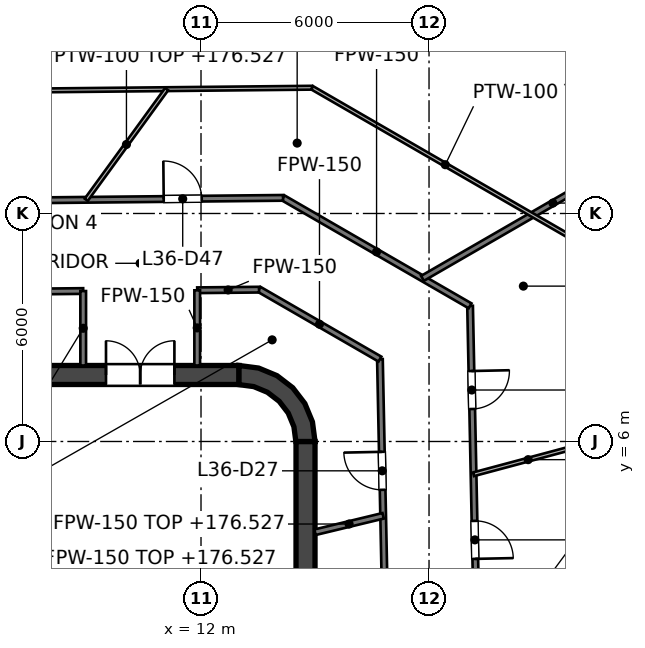
"""IFC4 building model, lengths in metres.
Left out: names, types, materials, properties, quantities, classifications, styles, units other than length and angle.
Written with IfcOpenShell. Run it as: python <this file> out.ifc"""

import sys

from ifc_helpers import new_model, si_unit, direction, frame, frame_2d, origin, place, context, subcontext, project, spatial, polyline, rectangle, outline, extrude, element, fill, save


model = new_model("IFC4")
c1 = context("Model", 3, precision=1e-05, world=origin(), true_north=direction((0.0, 1.0)))
c2 = subcontext(c1, "Body", "Model", "MODEL_VIEW")
j1 = project(units=[si_unit("LENGTHUNIT", "METRE"), si_unit("PLANEANGLEUNIT", "RADIAN")], contexts=[c1])
p1 = place(None, origin())
s1 = spatial("IfcSite", under=j1, at=p1, CompositionType="ELEMENT")
p2 = place(p1, origin())
s2 = spatial("IfcBuilding", under=s1, at=p2, CompositionType="ELEMENT")
p3 = place(p2, frame((0.0, 0.0, 173.6)))
s3 = spatial("IfcBuildingStorey", under=s2, at=p3, CompositionType="ELEMENT", Elevation=173.6)
p4 = place(p3, frame((-13.0, 7.75, 0.0), z_axis=(0.0, 0.0, 1.0), x_axis=(1.0, 0.0, 0.0)))
e1 = element("IfcWall", 1, at=p4, inside=s3, PredefinedType="SHEAR", context=c2, shape_type="SweptSolid", body=[
    extrude(rectangle(XDim=26.0, YDim=0.5, at=frame_2d((13.0, 0.0))), origin(), (0.0, 0.0, 1.0), 4.0),
])
p5 = place(p4, frame((1.7, 0.0, 0.0)))
e2 = element("IfcOpeningElement", 2, at=p5, cuts=e1, PredefinedType="OPENING", context=c2, shape_type="SweptSolid", body=[
    extrude(rectangle(XDim=1.8, YDim=2.1, at=frame_2d((0.9, 1.05))), frame((0.0, 0.25, 0.0), z_axis=(0.0, -1.0, 0.0), x_axis=(1.0, 0.0, 0.0)), (0.0, 0.0, 1.0), 0.5),
])
p6 = place(p4, frame((22.5, 0.0, 0.0)))
e3 = element("IfcOpeningElement", 3, at=p6, cuts=e1, PredefinedType="OPENING", context=c2, shape_type="SweptSolid", body=[
    extrude(rectangle(XDim=1.8, YDim=2.1, at=frame_2d((0.9, 1.05))), frame((0.0, 0.25, 0.0), z_axis=(0.0, -1.0, 0.0), x_axis=(1.0, 0.0, 0.0)), (0.0, 0.0, 1.0), 0.5),
])
p7 = place(p3, frame((14.75, -6.0, 0.0), z_axis=(0.0, 0.0, 1.0), x_axis=(0.0, 1.0, 0.0)))
e4 = element("IfcWall", 4, at=p7, inside=s3, PredefinedType="SHEAR", context=c2, shape_type="SweptSolid", body=[
    extrude(rectangle(XDim=12.0, YDim=0.5, at=frame_2d((6.0, 0.0))), origin(), (0.0, 0.0, 1.0), 4.0),
])
p8 = place(p3, origin())
e5 = element("IfcWall", 5, at=p8, inside=s3, PredefinedType="SHEAR", context=c2, shape_type="SweptSolid", body=[
    extrude(outline(polyline([(13.0, 8.0), (13.0, 7.496), (13.387, 7.445), (13.748, 7.295), (14.058, 7.058), (14.295, 6.748), (14.445, 6.387), (14.496, 6.0), (15.0, 6.0), (14.932, 6.518), (14.732, 7.0), (14.414, 7.414), (14.0, 7.732), (13.518, 7.932), (13.0, 8.0)])), origin(), (0.0, 0.0, 1.0), 4.0),
])
p9 = place(p3, frame((9.0, 4.1, 0.0), z_axis=(0.0, 0.0, 1.0), x_axis=(0.0, 1.0, 0.0)))
e6 = element("IfcWall", 6, at=p9, inside=s3, PredefinedType="SOLIDWALL", context=c2, shape_type="SweptSolid", body=[
    extrude(rectangle(XDim=2.5, YDim=0.25, at=frame_2d((1.25, 0.0))), origin(), (0.0, 0.0, 1.0), 3.85),
])
p10 = place(p9, frame((0.65, 0.0, 0.0)))
e7 = element("IfcOpeningElement", 7, at=p10, cuts=e6, PredefinedType="OPENING", context=c2, shape_type="SweptSolid", body=[
    extrude(rectangle(XDim=1.2, YDim=2.1, at=frame_2d((0.6, 1.05))), frame((0.0, 0.125, 0.0), z_axis=(0.0, -1.0, 0.0), x_axis=(1.0, 0.0, 0.0)), (0.0, 0.0, 1.0), 0.25),
])
p11 = place(p3, frame((-9.125, 7.05, 0.0), z_axis=(0.0, 0.0, 1.0), x_axis=(1.0, 0.0, 0.0)))
e8 = element("IfcWall", 8, at=p11, inside=s3, PredefinedType="SOLIDWALL", context=c2, shape_type="SweptSolid", body=[
    extrude(rectangle(XDim=18.25, YDim=0.9, at=frame_2d((9.125, 0.0))), origin(), (0.0, 0.0, 1.0), 3.85),
])
p12 = place(p3, frame((0.775, 3.975, 0.0), z_axis=(0.0, 0.0, 1.0), x_axis=(1.0, 0.0, 0.0)))
e9 = element("IfcWall", 9, at=p12, inside=s3, PredefinedType="SOLIDWALL", context=c2, shape_type="SweptSolid", body=[
    extrude(rectangle(XDim=8.35, YDim=0.25, at=frame_2d((4.175, 0.0))), origin(), (0.0, 0.0, 1.0), 3.85),
])
p13 = place(p3, frame((9.0, 1.65, 0.0), z_axis=(0.0, 0.0, 1.0), x_axis=(0.0, 1.0, 0.0)))
e10 = element("IfcWall", 10, at=p13, inside=s3, PredefinedType="PARTITIONING", context=c2, shape_type="SweptSolid", body=[
    extrude(rectangle(XDim=2.2, YDim=0.25, at=frame_2d((1.1, 0.0))), origin(), (0.0, 0.0, 1.0), 3.85),
])
p14 = place(p3, frame((11.8, -7.5, 0.0), z_axis=(0.0, 0.0, 1.0), x_axis=(0.0, 1.0, 0.0)))
e11 = element("IfcWall", 11, at=p14, inside=s3, PredefinedType="SOLIDWALL", context=c2, shape_type="SweptSolid", body=[
    extrude(rectangle(XDim=15.0, YDim=0.4, at=frame_2d((7.5, 0.0))), origin(), (0.0, 0.0, 1.0), 3.85),
])
p15 = place(p14, frame((11.3, 0.0, 0.0)))
e12 = element("IfcOpeningElement", 12, at=p15, cuts=e11, PredefinedType="OPENING", context=c2, shape_type="SweptSolid", body=[
    extrude(rectangle(XDim=1.1, YDim=2.1, at=frame_2d((0.55, 1.05))), frame((0.0, 0.2, 0.0), z_axis=(0.0, -1.0, 0.0), x_axis=(1.0, 0.0, 0.0)), (0.0, 0.0, 1.0), 0.4),
])
p16 = place(p14, frame((8.4, 0.0, 0.0)))
e13 = element("IfcOpeningElement", 13, at=p16, cuts=e11, PredefinedType="OPENING", context=c2, shape_type="SweptSolid", body=[
    extrude(rectangle(XDim=1.1, YDim=2.1, at=frame_2d((0.55, 1.05))), frame((0.0, 0.2, 0.0), z_axis=(0.0, -1.0, 0.0), x_axis=(1.0, 0.0, 0.0)), (0.0, 0.0, 1.0), 0.4),
])
p17 = place(p14, frame((5.5, 0.0, 0.0)))
e14 = element("IfcOpeningElement", 14, at=p17, cuts=e11, PredefinedType="OPENING", context=c2, shape_type="SweptSolid", body=[
    extrude(rectangle(XDim=1.1, YDim=2.1, at=frame_2d((0.55, 1.05))), frame((0.0, 0.2, 0.0), z_axis=(0.0, -1.0, 0.0), x_axis=(1.0, 0.0, 0.0)), (0.0, 0.0, 1.0), 0.4),
])
p18 = place(p14, frame((13.697, 0.0, 0.0)))
e15 = element("IfcOpeningElement", 15, at=p18, cuts=e11, PredefinedType="OPENING", context=c2, shape_type="SweptSolid", body=[
    extrude(rectangle(XDim=0.9, YDim=2.1, at=frame_2d((0.45, 1.05))), frame((0.0, 0.2, 0.0), z_axis=(0.0, -1.0, 0.0), x_axis=(1.0, 0.0, 0.0)), (0.0, 0.0, 1.0), 0.4),
])
p19 = place(p14, frame((0.403, 0.0, 0.0)))
e16 = element("IfcOpeningElement", 16, at=p19, cuts=e11, PredefinedType="OPENING", context=c2, shape_type="SweptSolid", body=[
    extrude(rectangle(XDim=0.9, YDim=2.1, at=frame_2d((0.45, 1.05))), frame((0.0, 0.2, 0.0), z_axis=(0.0, -1.0, 0.0), x_axis=(1.0, 0.0, 0.0)), (0.0, 0.0, 1.0), 0.4),
])
e17 = element("IfcWall", 17, at=p8, inside=s3, PredefinedType="SOLIDWALL", context=c2, shape_type="SweptSolid", body=[
    extrude(outline(polyline([(12.0, -5.675), (12.0, -5.925), (14.25, -5.925), (14.5, -5.925), (14.5, -5.675), (14.5, -3.025), (14.5, -2.775), (14.5, -0.125), (14.5, 0.125), (14.5, 2.775), (14.5, 3.025), (14.5, 5.675), (14.5, 5.925), (14.25, 5.925), (12.0, 5.925), (12.0, 5.675), (14.25, 5.675), (14.25, 3.025), (12.0, 3.025), (12.0, 2.775), (14.25, 2.775), (14.25, 0.125), (12.0, 0.125), (12.0, -0.125), (14.25, -0.125), (14.25, -2.775), (12.0, -2.775), (12.0, -3.025), (14.25, -3.025), (14.25, -5.675), (12.0, -5.675)])), origin(), (0.0, 0.0, 1.0), 3.85),
])
p20 = place(p3, frame((16.708, 8.168, 0.0), z_axis=(0.0, 0.0, 1.0), x_axis=(0.020577520638, -0.999788260405, 0.0)))
e18 = element("IfcWall", 18, at=p20, inside=s3, PredefinedType="PARTITIONING", context=c2, shape_type="SweptSolid", body=[
    extrude(rectangle(XDim=14.688, YDim=0.15, at=frame_2d((7.344, 0.0))), origin(), (0.0, 0.0, 1.0), 2.927),
])
p21 = place(p20, frame((7.54, 0.0, 0.0)))
e19 = element("IfcOpeningElement", 19, at=p21, cuts=e18, PredefinedType="OPENING", context=c2, shape_type="SweptSolid", body=[
    extrude(rectangle(XDim=1.0, YDim=2.1, at=frame_2d((0.5, 1.05))), frame((0.0, 0.075, 0.0), z_axis=(0.0, -1.0, 0.0), x_axis=(1.0, 0.0, 0.0)), (0.0, 0.0, 1.0), 0.15),
])
p22 = place(p20, frame((2.44, 0.0, 0.0)))
e20 = element("IfcOpeningElement", 20, at=p22, cuts=e18, PredefinedType="OPENING", context=c2, shape_type="SweptSolid", body=[
    extrude(rectangle(XDim=1.0, YDim=2.1, at=frame_2d((0.5, 1.05))), frame((0.0, 0.075, 0.0), z_axis=(0.0, -1.0, 0.0), x_axis=(1.0, 0.0, 0.0)), (0.0, 0.0, 1.0), 0.15),
])
p23 = place(p3, frame((19.08, 9.57, 0.0), z_axis=(0.0, 0.0, 1.0), x_axis=(0.020585419538, -0.9997880978, 0.0)))
e21 = element("IfcWall", 21, at=p23, inside=s3, PredefinedType="PARTITIONING", context=c2, shape_type="SweptSolid", body=[
    extrude(rectangle(XDim=16.711, YDim=0.15, at=frame_2d((8.355, 0.0))), origin(), (0.0, 0.0, 1.0), 2.927),
])
p24 = place(p23, frame((15.239, 0.0, 0.0)))
e22 = element("IfcOpeningElement", 22, at=p24, cuts=e21, PredefinedType="OPENING", context=c2, shape_type="SweptSolid", body=[
    extrude(rectangle(XDim=1.0, YDim=2.1, at=frame_2d((0.5, 1.05))), frame((0.0, 0.075, 0.0), z_axis=(0.0, -1.0, 0.0), x_axis=(1.0, 0.0, 0.0)), (0.0, 0.0, 1.0), 0.15),
])
p25 = place(p23, frame((12.992, 0.0, 0.0)))
e23 = element("IfcOpeningElement", 23, at=p25, cuts=e21, PredefinedType="OPENING", context=c2, shape_type="SweptSolid", body=[
    extrude(rectangle(XDim=1.0, YDim=2.1, at=frame_2d((0.5, 1.05))), frame((0.0, 0.075, 0.0), z_axis=(0.0, -1.0, 0.0), x_axis=(1.0, 0.0, 0.0)), (0.0, 0.0, 1.0), 0.15),
])
p26 = place(p23, frame((9.024, 0.0, 0.0)))
e24 = element("IfcOpeningElement", 24, at=p26, cuts=e21, PredefinedType="OPENING", context=c2, shape_type="SweptSolid", body=[
    extrude(rectangle(XDim=1.0, YDim=2.1, at=frame_2d((0.5, 1.05))), frame((0.0, 0.075, 0.0), z_axis=(0.0, -1.0, 0.0), x_axis=(1.0, 0.0, 0.0)), (0.0, 0.0, 1.0), 0.15),
])
p27 = place(p23, frame((5.66, 0.0, 0.0)))
e25 = element("IfcOpeningElement", 25, at=p27, cuts=e21, PredefinedType="OPENING", context=c2, shape_type="SweptSolid", body=[
    extrude(rectangle(XDim=1.0, YDim=2.1, at=frame_2d((0.5, 1.05))), frame((0.0, 0.075, 0.0), z_axis=(0.0, -1.0, 0.0), x_axis=(1.0, 0.0, 0.0)), (0.0, 0.0, 1.0), 0.15),
])
p28 = place(p23, frame((1.716, 0.0, 0.0)))
e26 = element("IfcOpeningElement", 26, at=p28, cuts=e21, PredefinedType="OPENING", context=c2, shape_type="SweptSolid", body=[
    extrude(rectangle(XDim=1.0, YDim=2.1, at=frame_2d((0.5, 1.05))), frame((0.0, 0.075, 0.0), z_axis=(0.0, -1.0, 0.0), x_axis=(1.0, 0.0, 0.0)), (0.0, 0.0, 1.0), 0.15),
])
p29 = place(p3, frame((13.527, 10.005, 0.0), z_axis=(0.0, 0.0, 1.0), x_axis=(0.865976376876, -0.500084907484, 0.0)))
e27 = element("IfcWall", 27, at=p29, inside=s3, PredefinedType="PARTITIONING", context=c2, shape_type="SweptSolid", body=[
    extrude(rectangle(XDim=3.673, YDim=0.15, at=frame_2d((1.836, 0.0))), origin(), (0.0, 0.0, 1.0), 2.995),
])
p30 = place(p3, frame((14.159, 12.412, 0.0), z_axis=(0.0, 0.0, 1.0), x_axis=(0.865963066672, -0.500107955506, 0.0)))
e28 = element("IfcWall", 28, at=p30, inside=s3, PredefinedType="PARTITIONING", context=c2, shape_type="SweptSolid", body=[
    extrude(rectangle(XDim=5.683, YDim=0.15, at=frame_2d((2.841, 0.0))), origin(), (0.0, 0.0, 1.0), 2.995),
])
p31 = place(p3, frame((-8.9, 9.783, 0.0), z_axis=(0.0, 0.0, 1.0), x_axis=(0.999950834077, 0.009916119672, 0.0)))
e29 = element("IfcWall", 29, at=p31, inside=s3, PredefinedType="PARTITIONING", context=c2, shape_type="SweptSolid", body=[
    extrude(rectangle(XDim=17.801, YDim=0.15, at=frame_2d((8.9, 0.0))), origin(), (0.0, 0.0, 1.0), 2.927),
])
p32 = place(p31, frame((12.8, 0.0, 0.0)))
e30 = element("IfcOpeningElement", 30, at=p32, cuts=e29, PredefinedType="OPENING", context=c2, shape_type="SweptSolid", body=[
    extrude(rectangle(XDim=1.0, YDim=2.1, at=frame_2d((0.5, 1.05))), frame((0.0, 0.075, 0.0), z_axis=(0.0, -1.0, 0.0), x_axis=(1.0, 0.0, 0.0)), (0.0, 0.0, 1.0), 0.15),
])
p33 = place(p31, frame((3.899, 0.0, 0.0)))
e31 = element("IfcOpeningElement", 31, at=p33, cuts=e29, PredefinedType="OPENING", context=c2, shape_type="SweptSolid", body=[
    extrude(rectangle(XDim=1.0, YDim=2.1, at=frame_2d((0.5, 1.05))), frame((0.0, 0.075, 0.0), z_axis=(0.0, -1.0, 0.0), x_axis=(1.0, 0.0, 0.0)), (0.0, 0.0, 1.0), 0.15),
])
p34 = place(p3, frame((11.9, 9.98, 0.0), z_axis=(0.0, 0.0, 1.0), x_axis=(0.999950974094, 0.009901990141, 0.0)))
e32 = element("IfcWall", 32, at=p34, inside=s3, PredefinedType="PARTITIONING", context=c2, shape_type="SweptSolid", body=[
    extrude(rectangle(XDim=1.627, YDim=0.15, at=frame_2d((0.813, 0.0))), origin(), (0.0, 0.0, 1.0), 2.995),
])
p35 = place(p3, frame((-16.555, 12.107, 0.0), z_axis=(0.0, 0.0, 1.0), x_axis=(0.999950956073, 0.009903809825, 0.0)))
e33 = element("IfcWall", 33, at=p35, inside=s3, PredefinedType="PARTITIONING", context=c2, shape_type="SweptSolid", body=[
    extrude(rectangle(XDim=30.715, YDim=0.15, at=frame_2d((15.358, 0.0))), origin(), (0.0, 0.0, 1.0), 2.927),
])
p36 = place(p35, frame((27.575, 0.0, 0.0)))
e34 = element("IfcOpeningElement", 34, at=p36, cuts=e33, PredefinedType="OPENING", context=c2, shape_type="SweptSolid", body=[
    extrude(rectangle(XDim=1.0, YDim=2.1, at=frame_2d((0.5, 1.05))), frame((0.0, 0.075, 0.0), z_axis=(0.0, -1.0, 0.0), x_axis=(1.0, 0.0, 0.0)), (0.0, 0.0, 1.0), 0.15),
])
p37 = place(p35, frame((20.496, 0.0, 0.0)))
e35 = element("IfcOpeningElement", 35, at=p37, cuts=e33, PredefinedType="OPENING", context=c2, shape_type="SweptSolid", body=[
    extrude(rectangle(XDim=1.0, YDim=2.1, at=frame_2d((0.5, 1.05))), frame((0.0, 0.075, 0.0), z_axis=(0.0, -1.0, 0.0), x_axis=(1.0, 0.0, 0.0)), (0.0, 0.0, 1.0), 0.15),
])
p38 = place(p35, frame((13.746, 0.0, 0.0)))
e36 = element("IfcOpeningElement", 36, at=p38, cuts=e33, PredefinedType="OPENING", context=c2, shape_type="SweptSolid", body=[
    extrude(rectangle(XDim=1.0, YDim=2.1, at=frame_2d((0.5, 1.05))), frame((0.0, 0.075, 0.0), z_axis=(0.0, -1.0, 0.0), x_axis=(1.0, 0.0, 0.0)), (0.0, 0.0, 1.0), 0.15),
])
p39 = place(p35, frame((7.941, 0.0, 0.0)))
e37 = element("IfcOpeningElement", 37, at=p39, cuts=e33, PredefinedType="OPENING", context=c2, shape_type="SweptSolid", body=[
    extrude(rectangle(XDim=1.0, YDim=2.1, at=frame_2d((0.5, 1.05))), frame((0.0, 0.075, 0.0), z_axis=(0.0, -1.0, 0.0), x_axis=(1.0, 0.0, 0.0)), (0.0, 0.0, 1.0), 0.15),
])
p40 = place(p35, frame((2.812, 0.0, 0.0)))
e38 = element("IfcOpeningElement", 38, at=p40, cuts=e33, PredefinedType="OPENING", context=c2, shape_type="SweptSolid", body=[
    extrude(rectangle(XDim=1.0, YDim=2.1, at=frame_2d((0.5, 1.05))), frame((0.0, 0.075, 0.0), z_axis=(0.0, -1.0, 0.0), x_axis=(1.0, 0.0, 0.0)), (0.0, 0.0, 1.0), 0.15),
])
p41 = place(p3, frame((15.0, 3.612, 0.0), z_axis=(0.0, 0.0, 1.0), x_axis=(0.972133200519, 0.234429180027, 0.0)))
e39 = element("IfcWall", 39, at=p41, inside=s3, PredefinedType="PARTITIONING", context=c2, shape_type="SweptSolid", body=[
    extrude(rectangle(XDim=1.844, YDim=0.15, at=frame_2d((0.922, 0.0))), origin(), (0.0, 0.0, 1.0), 2.927),
])
p42 = place(p3, frame((17.828, 10.293, 0.0), z_axis=(0.0, 0.0, 1.0), x_axis=(0.866006511702, 0.500032720618, 0.0)))
e40 = element("IfcWall", 40, at=p42, inside=s3, PredefinedType="PARTITIONING", context=c2, shape_type="SweptSolid", body=[
    extrude(rectangle(XDim=7.924, YDim=0.15, at=frame_2d((3.962, 0.0))), origin(), (0.0, 0.0, 1.0), 3.152),
])
p43 = place(p3, frame((11.9, 8.0, 0.0), z_axis=(0.0, 0.0, 1.0), x_axis=(0.0, 1.0, 0.0)))
e41 = element("IfcWall", 41, at=p43, inside=s3, PredefinedType="PARTITIONING", context=c2, shape_type="SweptSolid", body=[
    extrude(rectangle(XDim=1.978, YDim=0.15, at=frame_2d((0.989, 0.0))), origin(), (0.0, 0.0, 1.0), 2.995),
])
p44 = place(p3, frame((8.9, 8.0, 0.0), z_axis=(0.0, 0.0, 1.0), x_axis=(0.0, 1.0, 0.0)))
e42 = element("IfcWall", 42, at=p44, inside=s3, PredefinedType="PARTITIONING", context=c2, shape_type="SweptSolid", body=[
    extrude(rectangle(XDim=1.959, YDim=0.15, at=frame_2d((0.979, 0.0))), origin(), (0.0, 0.0, 1.0), 3.076),
])
p45 = place(p3, frame((14.92, 15.31, 0.0), z_axis=(0.0, 0.0, 1.0), x_axis=(0.865883926938, -0.500244965063, 0.0)))
e43 = element("IfcWall", 43, at=p45, inside=s3, PredefinedType="PARTITIONING", context=c2, shape_type="SweptSolid", body=[
    extrude(rectangle(XDim=8.102, YDim=0.1, at=frame_2d((4.051, 0.0))), origin(), (0.0, 0.0, 1.0), 2.995),
])
p46 = place(p3, frame((-11.36, 15.048, 0.0), z_axis=(0.0, 0.0, 1.0), x_axis=(0.999950506848, 0.00994906304, 0.0)))
e44 = element("IfcWall", 44, at=p46, inside=s3, PredefinedType="PARTITIONING", context=c2, shape_type="SweptSolid", body=[
    extrude(rectangle(XDim=26.281, YDim=0.1, at=frame_2d((13.141, 0.0))), origin(), (0.0, 0.0, 1.0), 2.927),
])
p47 = place(p46, frame((16.01, 0.0, 0.0)))
e45 = element("IfcOpeningElement", 45, at=p47, cuts=e44, PredefinedType="OPENING", context=c2, shape_type="SweptSolid", body=[
    extrude(rectangle(XDim=1.8, YDim=2.1, at=frame_2d((0.9, 1.05))), frame((0.0, 0.05, 0.0), z_axis=(0.0, -1.0, 0.0), x_axis=(1.0, 0.0, 0.0)), (0.0, 0.0, 1.0), 0.1),
])
p48 = place(p46, frame((5.23, 0.0, 0.0)))
e46 = element("IfcOpeningElement", 46, at=p48, cuts=e44, PredefinedType="OPENING", context=c2, shape_type="SweptSolid", body=[
    extrude(rectangle(XDim=0.9, YDim=2.1, at=frame_2d((0.45, 1.05))), frame((0.0, 0.05, 0.0), z_axis=(0.0, -1.0, 0.0), x_axis=(1.0, 0.0, 0.0)), (0.0, 0.0, 1.0), 0.1),
])
p49 = place(p3, frame((19.171, 5.137, 0.0), z_axis=(0.0, 0.0, 1.0), x_axis=(0.965953908608, 0.25871421771, 0.0)))
e47 = element("IfcWall", 47, at=p49, inside=s3, PredefinedType="PARTITIONING", context=c2, shape_type="SweptSolid", body=[
    extrude(rectangle(XDim=2.976, YDim=0.1, at=frame_2d((1.488, 0.0))), origin(), (0.0, 0.0, 1.0), 3.85),
])
p50 = place(p3, frame((8.98, 12.361, 0.0), z_axis=(0.0, 0.0, 1.0), x_axis=(0.587982092085, 0.808873945301, 0.0)))
e48 = element("IfcWall", 48, at=p50, inside=s3, PredefinedType="PARTITIONING", context=c2, shape_type="SweptSolid", body=[
    extrude(rectangle(XDim=3.599, YDim=0.1, at=frame_2d((1.799, 0.0))), origin(), (0.0, 0.0, 1.0), 2.927),
])
p51 = place(p15, origin())
e49 = element("IfcDoor", 49, at=p51, inside=s3, OperationType="DOUBLE_DOOR_SLIDING", PredefinedType="DOOR", context=c2, shape_type="SweptSolid", body=[
    extrude(rectangle(XDim=1.1, YDim=2.1, at=frame_2d((0.55, 1.05))), frame((0.0, 0.025, 0.0), z_axis=(0.0, -1.0, 0.0), x_axis=(1.0, 0.0, 0.0)), (0.0, 0.0, 1.0), 0.05),
])
fill(e12, e49)
p52 = place(p10, origin())
e50 = element("IfcDoor", 50, at=p52, inside=s3, OperationType="SINGLE_SWING_LEFT", PredefinedType="DOOR", context=c2, shape_type="SweptSolid", body=[
    extrude(rectangle(XDim=1.2, YDim=2.1, at=frame_2d((0.6, 1.05))), frame((0.0, 0.025, 0.0), z_axis=(0.0, -1.0, 0.0), x_axis=(1.0, 0.0, 0.0)), (0.0, 0.0, 1.0), 0.05),
])
fill(e7, e50)
p53 = place(p18, origin())
e51 = element("IfcDoor", 51, at=p53, inside=s3, OperationType="SINGLE_SWING_RIGHT", PredefinedType="DOOR", context=c2, shape_type="SweptSolid", body=[
    extrude(rectangle(XDim=0.9, YDim=2.1, at=frame_2d((0.45, 1.05))), frame((0.0, 0.025, 0.0), z_axis=(0.0, -1.0, 0.0), x_axis=(1.0, 0.0, 0.0)), (0.0, 0.0, 1.0), 0.05),
])
fill(e15, e51)
p54 = place(p6, origin())
e52 = element("IfcDoor", 52, at=p54, inside=s3, OperationType="DOUBLE_DOOR_SINGLE_SWING", PredefinedType="DOOR", context=c2, shape_type="SweptSolid", body=[
    extrude(rectangle(XDim=1.8, YDim=2.1, at=frame_2d((0.9, 1.05))), frame((0.0, 0.025, 0.0), z_axis=(0.0, -1.0, 0.0), x_axis=(1.0, 0.0, 0.0)), (0.0, 0.0, 1.0), 0.05),
])
fill(e3, e52)
p55 = place(p22, origin())
e53 = element("IfcDoor", 53, at=p55, inside=s3, OperationType="SINGLE_SWING_LEFT", PredefinedType="DOOR", context=c2, shape_type="SweptSolid", body=[
    extrude(rectangle(XDim=1.0, YDim=2.1, at=frame_2d((0.5, 1.05))), frame((0.0, 0.025, 0.0), z_axis=(0.0, -1.0, 0.0), x_axis=(1.0, 0.0, 0.0)), (0.0, 0.0, 1.0), 0.05),
])
fill(e20, e53)
p56 = place(p27, origin())
e54 = element("IfcDoor", 54, at=p56, inside=s3, OperationType="SINGLE_SWING_RIGHT", PredefinedType="DOOR", context=c2, shape_type="SweptSolid", body=[
    extrude(rectangle(XDim=1.0, YDim=2.1, at=frame_2d((0.5, 1.05))), frame((0.0, 0.025, 0.0), z_axis=(0.0, -1.0, 0.0), x_axis=(1.0, 0.0, 0.0)), (0.0, 0.0, 1.0), 0.05),
])
fill(e25, e54)
p57 = place(p28, origin())
e55 = element("IfcDoor", 55, at=p57, inside=s3, OperationType="SINGLE_SWING_LEFT", PredefinedType="DOOR", context=c2, shape_type="SweptSolid", body=[
    extrude(rectangle(XDim=1.0, YDim=2.1, at=frame_2d((0.5, 1.05))), frame((0.0, 0.025, 0.0), z_axis=(0.0, -1.0, 0.0), x_axis=(1.0, 0.0, 0.0)), (0.0, 0.0, 1.0), 0.05),
])
fill(e26, e55)
p58 = place(p36, origin())
e56 = element("IfcDoor", 56, at=p58, inside=s3, OperationType="SINGLE_SWING_LEFT", PredefinedType="DOOR", context=c2, shape_type="SweptSolid", body=[
    extrude(rectangle(XDim=1.0, YDim=2.1, at=frame_2d((0.5, 1.05))), frame((0.0, 0.025, 0.0), z_axis=(0.0, -1.0, 0.0), x_axis=(1.0, 0.0, 0.0)), (0.0, 0.0, 1.0), 0.05),
])
fill(e34, e56)
save(model, sys.argv[1])
